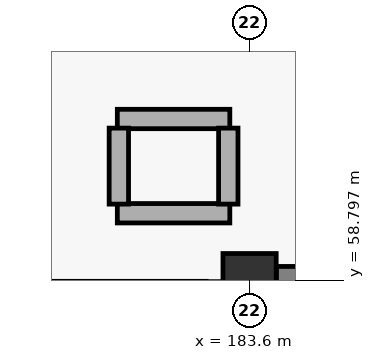
"""IFC4 building model, lengths in metres.
Left out: names, types, materials, properties, quantities, classifications, styles, units other than length and angle.
Written with IfcOpenShell. Run it as: python <this file> out.ifc"""

import sys

from ifc_helpers import new_model, si_unit, direction, frame, frame_2d, origin, origin_2d, place, context, subcontext, project, spatial, rectangle, extrude, element, save


model = new_model("IFC4")
c1 = context("Model", 3, precision=1e-05, world=origin(), true_north=direction((0.0, 1.0)))
c2 = subcontext(c1, "Body", "Model", "MODEL_VIEW")
j1 = project(units=[si_unit("LENGTHUNIT", "METRE"), si_unit("PLANEANGLEUNIT", "RADIAN")], contexts=[c1])
p1 = place(None, origin())
s1 = spatial("IfcSite", under=j1, at=p1, CompositionType="ELEMENT")
p2 = place(p1, origin())
s2 = spatial("IfcBuilding", under=s1, at=p2, CompositionType="ELEMENT")
p3 = place(p2, frame((0.0, 0.0, 20.7)))
s3 = spatial("IfcBuildingStorey", under=s2, at=p3, CompositionType="ELEMENT", Elevation=20.7)
p4 = place(p3, frame((183.6, 58.8, 0.0), z_axis=(0.0, 0.0, 1.0), x_axis=(1.0, 0.0, 0.0)))
e1 = element("IfcColumn", 1, at=p4, inside=s3, PredefinedType="COLUMN", context=c2, shape_type="SweptSolid", body=[
    extrude(rectangle(XDim=0.7, YDim=0.7, at=origin_2d()), origin(), (0.0, 0.0, 1.0), 5.7),
])
p5 = place(p3, frame((183.952, 58.8, 0.0), z_axis=(0.0, 0.0, 1.0), x_axis=(1.0, 0.0, 0.0)))
e2 = element("IfcWall", 2, at=p5, inside=s3, PredefinedType="SOLIDWALL", context=c2, shape_type="SweptSolid", body=[
    extrude(rectangle(XDim=7.696, YDim=0.36, at=frame_2d((3.848, 0.0))), origin(), (0.0, 0.0, 1.0), 4.66),
])
p6 = place(p5, frame((1.368, 0.0, 0.85)))
e3 = element("IfcOpeningElement", 3, at=p6, cuts=e2, PredefinedType="OPENING", context=c2, shape_type="SweptSolid", body=[
    extrude(rectangle(XDim=2.1, YDim=2.4, at=frame_2d((1.05, 1.2))), frame((0.0, 0.19, 0.0), z_axis=(0.0, -1.0, 0.0), x_axis=(1.0, 0.0, 0.0)), (0.0, 0.0, 1.0), 0.38),
])
p7 = place(p5, frame((4.368, 0.0, 0.85)))
e4 = element("IfcOpeningElement", 4, at=p7, cuts=e2, PredefinedType="OPENING", context=c2, shape_type="SweptSolid", body=[
    extrude(rectangle(XDim=2.25, YDim=2.25, at=frame_2d((1.125, 1.125))), frame((0.0, 0.19, 0.0), z_axis=(0.0, -1.0, 0.0), x_axis=(1.0, 0.0, 0.0)), (0.0, 0.0, 1.0), 0.38),
])
p8 = place(p3, frame((183.7, 31.1, 0.0), z_axis=(0.0, 0.0, 1.0), x_axis=(0.0, 1.0, 0.0)))
e5 = element("IfcWall", 5, at=p8, inside=s3, PredefinedType="PARAPET", context=c2, shape_type="SweptSolid", body=[
    extrude(rectangle(XDim=27.7, YDim=0.28, at=frame_2d((13.85, 0.0))), origin(), (0.0, 0.0, 1.0), 1.15),
])
for number, where, z_axis, x_axis in (
    (6, (181.86, 60.92, 0.0), (0.0, 0.0, 1.0), (1.0, 0.0, 0.0)),
    (7, (181.86, 59.68, 0.0), (0.0, 0.0, 1.0), (1.0, 0.0, 0.0)),
):
    element("IfcWall", number, at=place(p3, frame(where, z_axis=z_axis, x_axis=x_axis)), inside=s3, PredefinedType="PARTITIONING", context=c2, shape_type="SweptSolid", body=[
        extrude(rectangle(XDim=1.48, YDim=0.255, at=frame_2d((0.74, 0.0))), origin(), (0.0, 0.0, 1.0), 4.76),
    ])
p9 = place(p3, frame((181.88, 59.8, 0.0), z_axis=(0.0, 0.0, 1.0), x_axis=(0.0, 1.0, 0.0)))
e8 = element("IfcWall", 8, at=p9, inside=s3, PredefinedType="PARTITIONING", context=c2, shape_type="SweptSolid", body=[
    extrude(rectangle(XDim=1.0, YDim=0.255, at=frame_2d((0.5, 0.0))), origin(), (0.0, 0.0, 1.0), 4.98),
])
p10 = place(p3, frame((183.32, 59.8, 0.0), z_axis=(0.0, 0.0, 1.0), x_axis=(0.0, 1.0, 0.0)))
e9 = element("IfcWall", 9, at=p10, inside=s3, PredefinedType="PARTITIONING", context=c2, shape_type="SweptSolid", body=[
    extrude(rectangle(XDim=1.0, YDim=0.255, at=frame_2d((0.5, 0.0))), origin(), (0.0, 0.0, 1.0), 4.76),
])
save(model, sys.argv[1])
